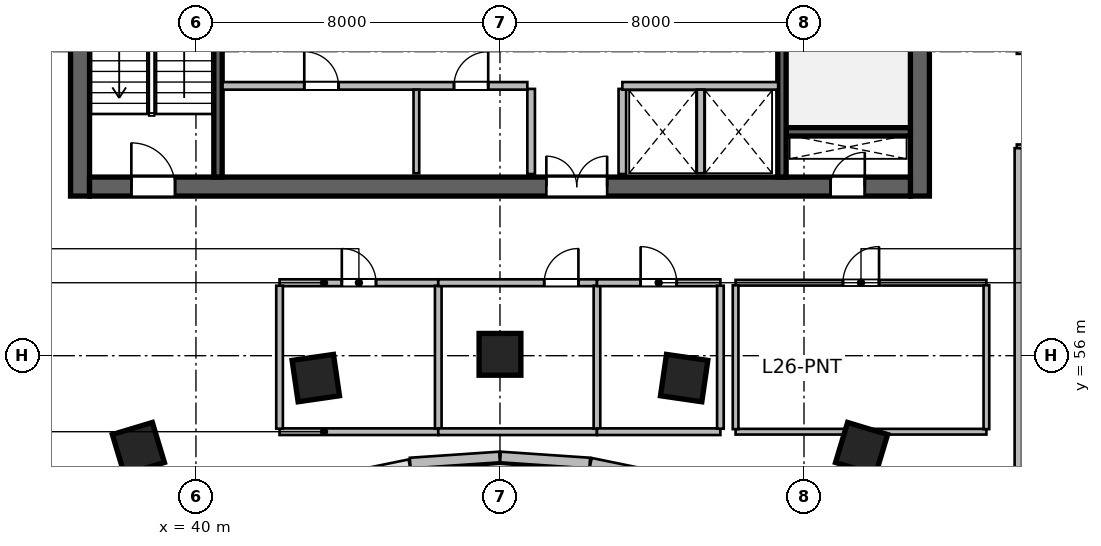
"""IFC4 building model, lengths in metres.
Left out: names, types, materials, properties, quantities, classifications, styles, units other than length and angle.
Written with IfcOpenShell. Run it as: python <this file> out.ifc"""

import sys

from ifc_helpers import new_model, si_unit, direction, frame, frame_2d, origin, origin_2d, place, context, subcontext, project, spatial, rectangle, extrude, source, transform, mapped, element, fill, save


model = new_model("IFC4")
c1 = context("Model", 3, precision=1e-05, world=origin(), true_north=direction((0.0, 1.0)))
c2 = subcontext(c1, "Body", "Model", "MODEL_VIEW")
j1 = project(units=[si_unit("LENGTHUNIT", "METRE"), si_unit("PLANEANGLEUNIT", "RADIAN")], contexts=[c1])
p1 = place(None, origin())
s1 = spatial("IfcSite", under=j1, at=p1, CompositionType="ELEMENT")
p2 = place(p1, origin())
s2 = spatial("IfcBuilding", under=s1, at=p2, CompositionType="ELEMENT")
p3 = place(p2, frame((0.0, 0.0, 111.6)))
s3 = spatial("IfcBuildingStorey", under=s2, at=p3, CompositionType="ELEMENT", Elevation=111.6)
m1 = source(origin(), c2, "Body", "SweptSolid", [
    extrude(rectangle(XDim=12.0, YDim=0.5, at=frame_2d((6.0, 0.0))), origin(), (0.0, 0.0, 1.0), 3.9),
])
for number, where, z_axis, x_axis in (
    (1, (36.95, 60.2, 0.0), (0.0, 0.0, 1.0), (0.0, 1.0, 0.0)),
    (2, (59.05, 60.2, 0.0), (0.0, 0.0, 1.0), (0.0, 1.0, 0.0)),
):
    element("IfcWall", number, at=place(p3, frame(where, z_axis=z_axis, x_axis=x_axis)), inside=s3, PredefinedType="SHEAR", context=c2, shape_type="MappedRepresentation", body=[
        mapped(m1, transform((0.0, 0.0, 0.0), scale=1.0)),
    ])
m2 = source(origin(), c2, "Body", "SweptSolid", [
    extrude(rectangle(XDim=21.6, YDim=0.5, at=frame_2d((10.8, 0.0))), origin(), (0.0, 0.0, 1.0), 3.9),
])
p4 = place(p3, frame((37.2, 60.45, 0.0), z_axis=(0.0, 0.0, 1.0), x_axis=(1.0, 0.0, 0.0)))
e3 = element("IfcWall", 3, at=p4, inside=s3, PredefinedType="SHEAR", context=c2, shape_type="MappedRepresentation", body=[
    mapped(m2, transform((0.0, 0.0, 0.0), scale=1.0)),
])
p5 = place(p4, frame((1.1, 0.0, 0.0)))
e4 = element("IfcOpeningElement", 4, at=p5, cuts=e3, PredefinedType="OPENING", context=c2, shape_type="SweptSolid", body=[
    extrude(rectangle(XDim=1.15, YDim=2.15, at=frame_2d((0.575, 1.075))), frame((0.0, 0.26, 0.0), z_axis=(0.0, -1.0, 0.0), x_axis=(1.0, 0.0, 0.0)), (0.0, 0.0, 1.0), 0.52),
])
p6 = place(p4, frame((19.5, 0.0, 0.0)))
e5 = element("IfcOpeningElement", 5, at=p6, cuts=e3, PredefinedType="OPENING", context=c2, shape_type="SweptSolid", body=[
    extrude(rectangle(XDim=0.9, YDim=2.1, at=frame_2d((0.45, 1.05))), frame((0.0, 0.26, 0.0), z_axis=(0.0, -1.0, 0.0), x_axis=(1.0, 0.0, 0.0)), (0.0, 0.0, 1.0), 0.52),
])
p7 = place(p4, frame((12.02, 0.0, 0.0)))
e6 = element("IfcOpeningElement", 6, at=p7, cuts=e3, PredefinedType="OPENING", context=c2, shape_type="SweptSolid", body=[
    extrude(rectangle(XDim=1.6, YDim=2.15, at=frame_2d((0.8, 1.075))), frame((0.0, 0.26, 0.0), z_axis=(0.0, -1.0, 0.0), x_axis=(1.0, 0.0, 0.0)), (0.0, 0.0, 1.0), 0.52),
])
m3 = source(origin(), c2, "Body", "SweptSolid", [
    extrude(rectangle(XDim=3.27, YDim=0.22, at=frame_2d((1.635, 0.0))), origin(), (0.0, 0.0, 1.0), 3.9),
])
p8 = place(p3, frame((55.53, 61.89, 0.0), z_axis=(0.0, 0.0, 1.0), x_axis=(1.0, 0.0, 0.0)))
e7 = element("IfcWall", 7, at=p8, inside=s3, PredefinedType="SHEAR", context=c2, shape_type="MappedRepresentation", body=[
    mapped(m3, transform((0.0, 0.0, 0.0), scale=1.0)),
])
m4 = source(origin(), c2, "Body", "SweptSolid", [
    extrude(rectangle(XDim=11.0, YDim=0.22, at=frame_2d((5.5, 0.0))), origin(), (0.0, 0.0, 1.0), 3.9),
])
p9 = place(p3, frame((40.58, 60.7, 0.0), z_axis=(0.0, 0.0, 1.0), x_axis=(0.0, 1.0, 0.0)))
e8 = element("IfcWall", 8, at=p9, inside=s3, PredefinedType="SHEAR", context=c2, shape_type="MappedRepresentation", body=[
    mapped(m4, transform((0.0, 0.0, 0.0), scale=1.0)),
])
p10 = place(p3, frame((55.42, 60.7, 0.0), z_axis=(0.0, 0.0, 1.0), x_axis=(0.0, 1.0, 0.0)))
e9 = element("IfcWall", 9, at=p10, inside=s3, PredefinedType="SHEAR", context=c2, shape_type="MappedRepresentation", body=[
    mapped(m4, transform((0.0, 0.0, 0.0), scale=1.0)),
])
p11 = place(p10, frame((9.545, 0.0, 0.0)))
e10 = element("IfcOpeningElement", 10, at=p11, cuts=e9, PredefinedType="OPENING", context=c2, shape_type="SweptSolid", body=[
    extrude(rectangle(XDim=1.15, YDim=2.15, at=frame_2d((0.575, 1.075))), frame((0.0, 0.12, 0.0), z_axis=(0.0, -1.0, 0.0), x_axis=(1.0, 0.0, 0.0)), (0.0, 0.0, 1.0), 0.24),
])
m5 = source(origin(), c2, "Body", "SweptSolid", [
    extrude(rectangle(XDim=1.1, YDim=1.1, at=origin_2d()), origin(), (0.0, 0.0, 1.0), 3.9),
])
for number, where, z_axis, x_axis in (
    (11, (38.485, 53.558, 0.0), (0.0, 0.0, 1.0), (-0.289, 0.957, 0.0)),
    (12, (43.154, 55.411, 0.0), (0.0, 0.0, 1.0), (-0.143, 0.99, 0.0)),
    (13, (48.0, 56.036, 0.0), (0.0, 0.0, 1.0), (0.0, 1.0, 0.0)),
    (14, (52.846, 55.411, 0.0), (0.0, 0.0, 1.0), (0.143, 0.99, 0.0)),
    (15, (57.515, 53.558, 0.0), (0.0, 0.0, 1.0), (0.289, 0.957, 0.0)),
):
    element("IfcColumn", number, at=place(p3, frame(where, z_axis=z_axis, x_axis=x_axis)), inside=s3, PredefinedType="COLUMN", context=c2, shape_type="MappedRepresentation", body=[
        mapped(m5, transform((0.0, 0.0, 0.0), scale=1.0)),
    ])
m6 = source(origin(), c2, "Body", "SweptSolid", [
    extrude(rectangle(XDim=2.374, YDim=0.28, at=frame_2d((1.187, 0.0))), origin(), (0.0, 0.0, 1.0), 3.65),
])
p12 = place(p3, frame((52.711, 52.695, 0.0), z_axis=(0.0, 0.0, 1.0), x_axis=(-0.979619827472, 0.200860632341, 0.0)))
e16 = element("IfcWall", 16, at=p12, inside=s3, PredefinedType="SOLIDWALL", context=c2, shape_type="MappedRepresentation", body=[
    mapped(m6, transform((0.0, 0.0, 0.0), scale=1.0)),
])
m7 = source(origin(), c2, "Body", "SweptSolid", [
    extrude(rectangle(XDim=2.355, YDim=0.28, at=frame_2d((1.177, 0.0))), origin(), (0.0, 0.0, 1.0), 3.65),
])
for number, where, z_axis, x_axis in (
    (17, (50.362, 53.175, 0.0), (0.0, 0.0, 1.0), (-0.998, 0.068, 0.0)),
    (18, (47.988, 53.335, 0.0), (0.0, 0.0, 1.0), (-0.998, -0.068, 0.0)),
):
    element("IfcWall", number, at=place(p3, frame(where, z_axis=z_axis, x_axis=x_axis)), inside=s3, PredefinedType="SOLIDWALL", context=c2, shape_type="MappedRepresentation", body=[
        mapped(m7, transform((0.0, 0.0, 0.0), scale=1.0)),
    ])
m8 = source(origin(), c2, "Body", "SweptSolid", [
    extrude(rectangle(XDim=2.24, YDim=0.2, at=frame_2d((1.12, 0.0))), origin(), (0.0, 0.0, 1.0), 3.65),
])
for number, where, z_axis, x_axis in (
    (19, (48.82, 60.78, 0.0), (0.0, 0.0, 1.0), (0.0, 1.0, 0.0)),
    (20, (51.22, 60.78, 0.0), (0.0, 0.0, 1.0), (0.0, 1.0, 0.0)),
):
    element("IfcWall", number, at=place(p3, frame(where, z_axis=z_axis, x_axis=x_axis)), inside=s3, PredefinedType="SOLIDWALL", context=c2, shape_type="MappedRepresentation", body=[
        mapped(m8, transform((0.0, 0.0, 0.0), scale=1.0)),
    ])
m9 = source(origin(), c2, "Body", "SweptSolid", [
    extrude(rectangle(XDim=8.02, YDim=0.2, at=frame_2d((4.01, 0.0))), origin(), (0.0, 0.0, 1.0), 3.65),
])
p13 = place(p3, frame((40.7, 63.1, 0.0), z_axis=(0.0, 0.0, 1.0), x_axis=(1.0, 0.0, 0.0)))
e21 = element("IfcWall", 21, at=p13, inside=s3, PredefinedType="SOLIDWALL", context=c2, shape_type="MappedRepresentation", body=[
    mapped(m9, transform((0.0, 0.0, 0.0), scale=1.0)),
])
p14 = place(p13, frame((2.15, 0.0, 0.0)))
e22 = element("IfcOpeningElement", 22, at=p14, cuts=e21, PredefinedType="OPENING", context=c2, shape_type="SweptSolid", body=[
    extrude(rectangle(XDim=0.9, YDim=2.1, at=frame_2d((0.45, 1.05))), frame((0.0, 0.11, 0.0), z_axis=(0.0, -1.0, 0.0), x_axis=(1.0, 0.0, 0.0)), (0.0, 0.0, 1.0), 0.22),
])
p15 = place(p13, frame((6.09, 0.0, 0.0)))
e23 = element("IfcOpeningElement", 23, at=p15, cuts=e21, PredefinedType="OPENING", context=c2, shape_type="SweptSolid", body=[
    extrude(rectangle(XDim=0.9, YDim=2.1, at=frame_2d((0.45, 1.05))), frame((0.0, 0.11, 0.0), z_axis=(0.0, -1.0, 0.0), x_axis=(1.0, 0.0, 0.0)), (0.0, 0.0, 1.0), 0.22),
])
m10 = source(origin(), c2, "Body", "SweptSolid", [
    extrude(rectangle(XDim=4.1, YDim=0.2, at=frame_2d((2.05, 0.0))), origin(), (0.0, 0.0, 1.0), 3.65),
])
p16 = place(p3, frame((51.22, 63.1, 0.0), z_axis=(0.0, 0.0, 1.0), x_axis=(1.0, 0.0, 0.0)))
e24 = element("IfcWall", 24, at=p16, inside=s3, PredefinedType="SOLIDWALL", context=c2, shape_type="MappedRepresentation", body=[
    mapped(m10, transform((0.0, 0.0, 0.0), scale=1.0)),
])
m11 = source(origin(), c2, "Body", "SweptSolid", [
    extrude(rectangle(XDim=2.2, YDim=0.15, at=frame_2d((1.1, 0.0))), origin(), (0.0, 0.0, 1.0), 3.65),
])
p17 = place(p3, frame((45.8, 60.8, 0.0), z_axis=(0.0, 0.0, 1.0), x_axis=(0.0, 1.0, 0.0)))
e25 = element("IfcWall", 25, at=p17, inside=s3, PredefinedType="PARTITIONING", context=c2, shape_type="MappedRepresentation", body=[
    mapped(m11, transform((0.0, 0.0, 0.0), scale=1.0)),
])
m12 = source(origin(), c2, "Body", "SweptSolid", [
    extrude(rectangle(XDim=2.2, YDim=0.2, at=frame_2d((1.1, 0.0))), origin(), (0.0, 0.0, 1.0), 3.65),
])
p18 = place(p3, frame((53.28, 60.8, 0.0), z_axis=(0.0, 0.0, 1.0), x_axis=(0.0, 1.0, 0.0)))
e26 = element("IfcWall", 26, at=p18, inside=s3, PredefinedType="SOLIDWALL", context=c2, shape_type="MappedRepresentation", body=[
    mapped(m12, transform((0.0, 0.0, 0.0), scale=1.0)),
])
m13 = source(origin(), c2, "Body", "SweptSolid", [
    extrude(rectangle(XDim=4.176, YDim=0.175, at=frame_2d((2.088, 0.0))), origin(), (0.0, 0.0, 1.0), 3.65),
])
p19 = place(p3, frame((42.2, 54.0, 0.0), z_axis=(0.0, 0.0, 1.0), x_axis=(1.0, 0.0, 0.0)))
e27 = element("IfcWall", 27, at=p19, inside=s3, PredefinedType="PARTITIONING", context=c2, shape_type="MappedRepresentation", body=[
    mapped(m13, transform((0.0, 0.0, 0.0), scale=1.0)),
])
m14 = source(origin(), c2, "Body", "SweptSolid", [
    extrude(rectangle(XDim=4.176, YDim=0.18, at=frame_2d((2.088, 0.0))), origin(), (0.0, 0.0, 1.0), 3.65),
])
p20 = place(p3, frame((42.2, 57.92, 0.0), z_axis=(0.0, 0.0, 1.0), x_axis=(1.0, 0.0, 0.0)))
e28 = element("IfcWall", 28, at=p20, inside=s3, PredefinedType="PLUMBINGWALL", context=c2, shape_type="MappedRepresentation", body=[
    mapped(m14, transform((0.0, 0.0, 0.0), scale=1.0)),
])
p21 = place(p20, frame((1.638, 0.0, 0.0)))
e29 = element("IfcOpeningElement", 29, at=p21, cuts=e28, PredefinedType="OPENING", context=c2, shape_type="SweptSolid", body=[
    extrude(rectangle(XDim=0.9, YDim=2.08, at=frame_2d((0.45, 1.04))), frame((0.0, 0.1, 0.0), z_axis=(0.0, -1.0, 0.0), x_axis=(1.0, 0.0, 0.0)), (0.0, 0.0, 1.0), 0.2),
])
m15 = source(origin(), c2, "Body", "SweptSolid", [
    extrude(rectangle(XDim=3.763, YDim=0.175, at=frame_2d((1.881, 0.0))), origin(), (0.0, 0.0, 1.0), 3.65),
])
for number, where, z_axis, x_axis in (
    (30, (42.2, 54.079, 0.0), (0.0, 0.0, 1.0), (0.0, 1.0, 0.0)),
    (31, (46.376, 54.079, 0.0), (0.0, 0.0, 1.0), (0.0, 1.0, 0.0)),
):
    element("IfcWall", number, at=place(p3, frame(where, z_axis=z_axis, x_axis=x_axis)), inside=s3, PredefinedType="PARTITIONING", context=c2, shape_type="MappedRepresentation", body=[
        mapped(m15, transform((0.0, 0.0, 0.0), scale=1.0)),
    ])
p22 = place(p3, frame((46.376, 54.0, 0.0), z_axis=(0.0, 0.0, 1.0), x_axis=(1.0, 0.0, 0.0)))
e32 = element("IfcWall", 32, at=p22, inside=s3, PredefinedType="PARTITIONING", context=c2, shape_type="MappedRepresentation", body=[
    mapped(m13, transform((0.0, 0.0, 0.0), scale=1.0)),
])
p23 = place(p3, frame((46.376, 57.92, 0.0), z_axis=(0.0, 0.0, 1.0), x_axis=(1.0, 0.0, 0.0)))
e33 = element("IfcWall", 33, at=p23, inside=s3, PredefinedType="PLUMBINGWALL", context=c2, shape_type="MappedRepresentation", body=[
    mapped(m14, transform((0.0, 0.0, 0.0), scale=1.0)),
])
p24 = place(p23, frame((2.788, 0.0, 0.0)))
e34 = element("IfcOpeningElement", 34, at=p24, cuts=e33, PredefinedType="OPENING", context=c2, shape_type="SweptSolid", body=[
    extrude(rectangle(XDim=0.9, YDim=2.08, at=frame_2d((0.45, 1.04))), frame((0.0, 0.1, 0.0), z_axis=(0.0, -1.0, 0.0), x_axis=(1.0, 0.0, 0.0)), (0.0, 0.0, 1.0), 0.2),
])
p25 = place(p3, frame((50.552, 54.079, 0.0), z_axis=(0.0, 0.0, 1.0), x_axis=(0.0, 1.0, 0.0)))
e35 = element("IfcWall", 35, at=p25, inside=s3, PredefinedType="PARTITIONING", context=c2, shape_type="MappedRepresentation", body=[
    mapped(m15, transform((0.0, 0.0, 0.0), scale=1.0)),
])
m16 = source(origin(), c2, "Body", "SweptSolid", [
    extrude(rectangle(XDim=3.248, YDim=0.175, at=frame_2d((1.624, 0.0))), origin(), (0.0, 0.0, 1.0), 3.65),
])
p26 = place(p3, frame((50.552, 54.0, 0.0), z_axis=(0.0, 0.0, 1.0), x_axis=(1.0, 0.0, 0.0)))
e36 = element("IfcWall", 36, at=p26, inside=s3, PredefinedType="PARTITIONING", context=c2, shape_type="MappedRepresentation", body=[
    mapped(m16, transform((0.0, 0.0, 0.0), scale=1.0)),
])
m17 = source(origin(), c2, "Body", "SweptSolid", [
    extrude(rectangle(XDim=3.248, YDim=0.18, at=frame_2d((1.624, 0.0))), origin(), (0.0, 0.0, 1.0), 3.65),
])
p27 = place(p3, frame((50.552, 57.92, 0.0), z_axis=(0.0, 0.0, 1.0), x_axis=(1.0, 0.0, 0.0)))
e37 = element("IfcWall", 37, at=p27, inside=s3, PredefinedType="PLUMBINGWALL", context=c2, shape_type="MappedRepresentation", body=[
    mapped(m17, transform((0.0, 0.0, 0.0), scale=1.0)),
])
p28 = place(p27, frame((1.149, 0.0, 0.0)))
e38 = element("IfcOpeningElement", 38, at=p28, cuts=e37, PredefinedType="OPENING", context=c2, shape_type="SweptSolid", body=[
    extrude(rectangle(XDim=0.95, YDim=2.12, at=frame_2d((0.475, 1.06))), frame((0.0, 0.1, 0.0), z_axis=(0.0, -1.0, 0.0), x_axis=(1.0, 0.0, 0.0)), (0.0, 0.0, 1.0), 0.2),
])
p29 = place(p3, frame((53.8, 54.079, 0.0), z_axis=(0.0, 0.0, 1.0), x_axis=(0.0, 1.0, 0.0)))
e39 = element("IfcWall", 39, at=p29, inside=s3, PredefinedType="PARTITIONING", context=c2, shape_type="MappedRepresentation", body=[
    mapped(m15, transform((0.0, 0.0, 0.0), scale=1.0)),
])
m18 = source(origin(), c2, "Body", "SweptSolid", [
    extrude(rectangle(XDim=6.6, YDim=0.15, at=frame_2d((3.3, 0.0))), origin(), (0.0, 0.0, 1.0), 3.095),
])
p30 = place(p3, frame((54.2, 54.0, 0.0), z_axis=(0.0, 0.0, 1.0), x_axis=(1.0, 0.0, 0.0)))
e40 = element("IfcWall", 40, at=p30, inside=s3, PredefinedType="PARTITIONING", context=c2, shape_type="MappedRepresentation", body=[
    mapped(m18, transform((0.0, 0.0, 0.0), scale=1.0)),
])
m19 = source(origin(), c2, "Body", "SweptSolid", [
    extrude(rectangle(XDim=6.6, YDim=0.15, at=frame_2d((3.3, 0.0))), origin(), (0.0, 0.0, 1.0), 3.65),
])
p31 = place(p3, frame((54.2, 57.92, 0.0), z_axis=(0.0, 0.0, 1.0), x_axis=(1.0, 0.0, 0.0)))
e41 = element("IfcWall", 41, at=p31, inside=s3, PredefinedType="PARTITIONING", context=c2, shape_type="MappedRepresentation", body=[
    mapped(m19, transform((0.0, 0.0, 0.0), scale=1.0)),
])
p32 = place(p31, frame((2.825, 0.0, 0.0)))
e42 = element("IfcOpeningElement", 42, at=p32, cuts=e41, PredefinedType="OPENING", context=c2, shape_type="SweptSolid", body=[
    extrude(rectangle(XDim=0.95, YDim=2.1, at=frame_2d((0.475, 1.05))), frame((0.0, 0.085, 0.0), z_axis=(0.0, -1.0, 0.0), x_axis=(1.0, 0.0, 0.0)), (0.0, 0.0, 1.0), 0.17),
])
m20 = source(origin(), c2, "Body", "SweptSolid", [
    extrude(rectangle(XDim=3.785, YDim=0.15, at=frame_2d((1.893, 0.0))), origin(), (0.0, 0.0, 1.0), 3.65),
])
for number, where, z_axis, x_axis in (
    (43, (54.2, 54.067, 0.0), (0.0, 0.0, 1.0), (0.0, 1.0, 0.0)),
    (44, (60.8, 54.067, 0.0), (0.0, 0.0, 1.0), (0.0, 1.0, 0.0)),
):
    element("IfcWall", number, at=place(p3, frame(where, z_axis=z_axis, x_axis=x_axis)), inside=s3, PredefinedType="PARTITIONING", context=c2, shape_type="MappedRepresentation", body=[
        mapped(m20, transform((0.0, 0.0, 0.0), scale=1.0)),
    ])
m21 = source(origin(), c2, "Body", "SweptSolid", [
    extrude(rectangle(XDim=6.9, YDim=0.195, at=frame_2d((3.45, 0.0))), origin(), (0.0, 0.0, 1.0), 3.65),
])
p33 = place(p3, frame((61.6, 64.04, 0.0), z_axis=(0.0, 0.0, 1.0), x_axis=(1.0, 0.0, 0.0)))
e45 = element("IfcWall", 45, at=p33, inside=s3, PredefinedType="PARTITIONING", context=c2, shape_type="MappedRepresentation", body=[
    mapped(m21, transform((0.0, 0.0, 0.0), scale=1.0)),
])
p34 = place(p33, frame((2.975, 0.0, 0.0)))
e46 = element("IfcOpeningElement", 46, at=p34, cuts=e45, PredefinedType="OPENING", context=c2, shape_type="SweptSolid", body=[
    extrude(rectangle(XDim=0.95, YDim=2.1, at=frame_2d((0.475, 1.05))), frame((0.0, 0.107, 0.0), z_axis=(0.0, -1.0, 0.0), x_axis=(1.0, 0.0, 0.0)), (0.0, 0.0, 1.0), 0.215),
])
p35 = place(p3, frame((61.6, 61.46, 0.0), z_axis=(0.0, 0.0, 1.0), x_axis=(1.0, 0.0, 0.0)))
e47 = element("IfcWall", 47, at=p35, inside=s3, PredefinedType="PARTITIONING", context=c2, shape_type="MappedRepresentation", body=[
    mapped(m21, transform((0.0, 0.0, 0.0), scale=1.0)),
])
p36 = place(p35, frame((2.975, 0.0, 0.0)))
e48 = element("IfcOpeningElement", 48, at=p36, cuts=e47, PredefinedType="OPENING", context=c2, shape_type="SweptSolid", body=[
    extrude(rectangle(XDim=0.95, YDim=2.1, at=frame_2d((0.475, 1.05))), frame((0.0, 0.107, 0.0), z_axis=(0.0, -1.0, 0.0), x_axis=(1.0, 0.0, 0.0)), (0.0, 0.0, 1.0), 0.215),
])
m22 = source(origin(), c2, "Body", "SweptSolid", [
    extrude(rectangle(XDim=13.988, YDim=0.195, at=frame_2d((6.994, 0.0))), origin(), (0.0, 0.0, 1.0), 2.942),
])
p37 = place(p3, frame((61.64, 47.472, 0.0), z_axis=(0.0, 0.0, 1.0), x_axis=(0.0, 1.0, 0.0)))
e49 = element("IfcWall", 49, at=p37, inside=s3, PredefinedType="PARTITIONING", context=c2, shape_type="MappedRepresentation", body=[
    mapped(m22, transform((0.0, 0.0, 0.0), scale=1.0)),
])
m23 = source(origin(), c2, "Body", "SweptSolid", [
    extrude(rectangle(XDim=1.15, YDim=2.15, at=frame_2d((0.575, 1.075))), frame((0.0, 0.025, 0.0), z_axis=(0.0, -1.0, 0.0), x_axis=(1.0, 0.0, 0.0)), (0.0, 0.0, 1.0), 0.05),
])
p38 = place(p5, origin())
e50 = element("IfcDoor", 50, at=p38, inside=s3, OperationType="SINGLE_SWING_LEFT", PredefinedType="DOOR", context=c2, shape_type="MappedRepresentation", body=[
    mapped(m23, transform((0.0, 0.0, 0.0), scale=1.0)),
])
fill(e4, e50)
m24 = source(origin(), c2, "Body", "SweptSolid", [
    extrude(rectangle(XDim=0.9, YDim=2.1, at=frame_2d((0.45, 1.05))), frame((0.0, 0.025, 0.0), z_axis=(0.0, -1.0, 0.0), x_axis=(1.0, 0.0, 0.0)), (0.0, 0.0, 1.0), 0.05),
])
p39 = place(p6, origin())
e51 = element("IfcDoor", 51, at=p39, inside=s3, OperationType="SINGLE_SWING_RIGHT", PredefinedType="DOOR", context=c2, shape_type="MappedRepresentation", body=[
    mapped(m24, transform((0.0, 0.0, 0.0), scale=1.0)),
])
fill(e5, e51)
m25 = source(origin(), c2, "Body", "SweptSolid", [
    extrude(rectangle(XDim=1.6, YDim=2.15, at=frame_2d((0.8, 1.075))), frame((0.0, 0.025, 0.0), z_axis=(0.0, -1.0, 0.0), x_axis=(1.0, 0.0, 0.0)), (0.0, 0.0, 1.0), 0.05),
])
p40 = place(p7, origin())
e52 = element("IfcDoor", 52, at=p40, inside=s3, OperationType="DOUBLE_DOOR_SINGLE_SWING", PredefinedType="DOOR", context=c2, shape_type="MappedRepresentation", body=[
    mapped(m25, transform((0.0, 0.0, 0.0), scale=1.0)),
])
fill(e6, e52)
p41 = place(p14, origin())
e53 = element("IfcDoor", 53, at=p41, inside=s3, OperationType="SINGLE_SWING_LEFT", PredefinedType="DOOR", context=c2, shape_type="MappedRepresentation", body=[
    mapped(m24, transform((0.0, 0.0, 0.0), scale=1.0)),
])
fill(e22, e53)
p42 = place(p15, origin())
e54 = element("IfcDoor", 54, at=p42, inside=s3, OperationType="SINGLE_SWING_RIGHT", PredefinedType="DOOR", context=c2, shape_type="MappedRepresentation", body=[
    mapped(m24, transform((0.0, 0.0, 0.0), scale=1.0)),
])
fill(e23, e54)
m26 = source(origin(), c2, "Body", "SweptSolid", [
    extrude(rectangle(XDim=0.9, YDim=2.08, at=frame_2d((0.45, 1.04))), frame((0.0, 0.025, 0.0), z_axis=(0.0, -1.0, 0.0), x_axis=(1.0, 0.0, 0.0)), (0.0, 0.0, 1.0), 0.05),
])
p43 = place(p21, origin())
e55 = element("IfcDoor", 55, at=p43, inside=s3, OperationType="SINGLE_SWING_LEFT", PredefinedType="DOOR", context=c2, shape_type="MappedRepresentation", body=[
    mapped(m26, transform((0.0, 0.0, 0.0), scale=1.0)),
])
fill(e29, e55)
p44 = place(p24, origin())
e56 = element("IfcDoor", 56, at=p44, inside=s3, OperationType="SINGLE_SWING_RIGHT", PredefinedType="DOOR", context=c2, shape_type="MappedRepresentation", body=[
    mapped(m26, transform((0.0, 0.0, 0.0), scale=1.0)),
])
fill(e34, e56)
m27 = source(origin(), c2, "Body", "SweptSolid", [
    extrude(rectangle(XDim=0.95, YDim=2.12, at=frame_2d((0.475, 1.06))), frame((0.0, 0.025, 0.0), z_axis=(0.0, -1.0, 0.0), x_axis=(1.0, 0.0, 0.0)), (0.0, 0.0, 1.0), 0.05),
])
p45 = place(p28, origin())
e57 = element("IfcDoor", 57, at=p45, inside=s3, OperationType="SINGLE_SWING_LEFT", PredefinedType="DOOR", context=c2, shape_type="MappedRepresentation", body=[
    mapped(m27, transform((0.0, 0.0, 0.0), scale=1.0)),
])
fill(e38, e57)
m28 = source(origin(), c2, "Body", "SweptSolid", [
    extrude(rectangle(XDim=0.95, YDim=2.1, at=frame_2d((0.475, 1.05))), frame((0.0, 0.025, 0.0), z_axis=(0.0, -1.0, 0.0), x_axis=(1.0, 0.0, 0.0)), (0.0, 0.0, 1.0), 0.05),
])
p46 = place(p32, origin())
e58 = element("IfcDoor", 58, at=p46, inside=s3, OperationType="SINGLE_SWING_RIGHT", PredefinedType="DOOR", context=c2, shape_type="MappedRepresentation", body=[
    mapped(m28, transform((0.0, 0.0, 0.0), scale=1.0)),
])
fill(e42, e58)
save(model, sys.argv[1])
